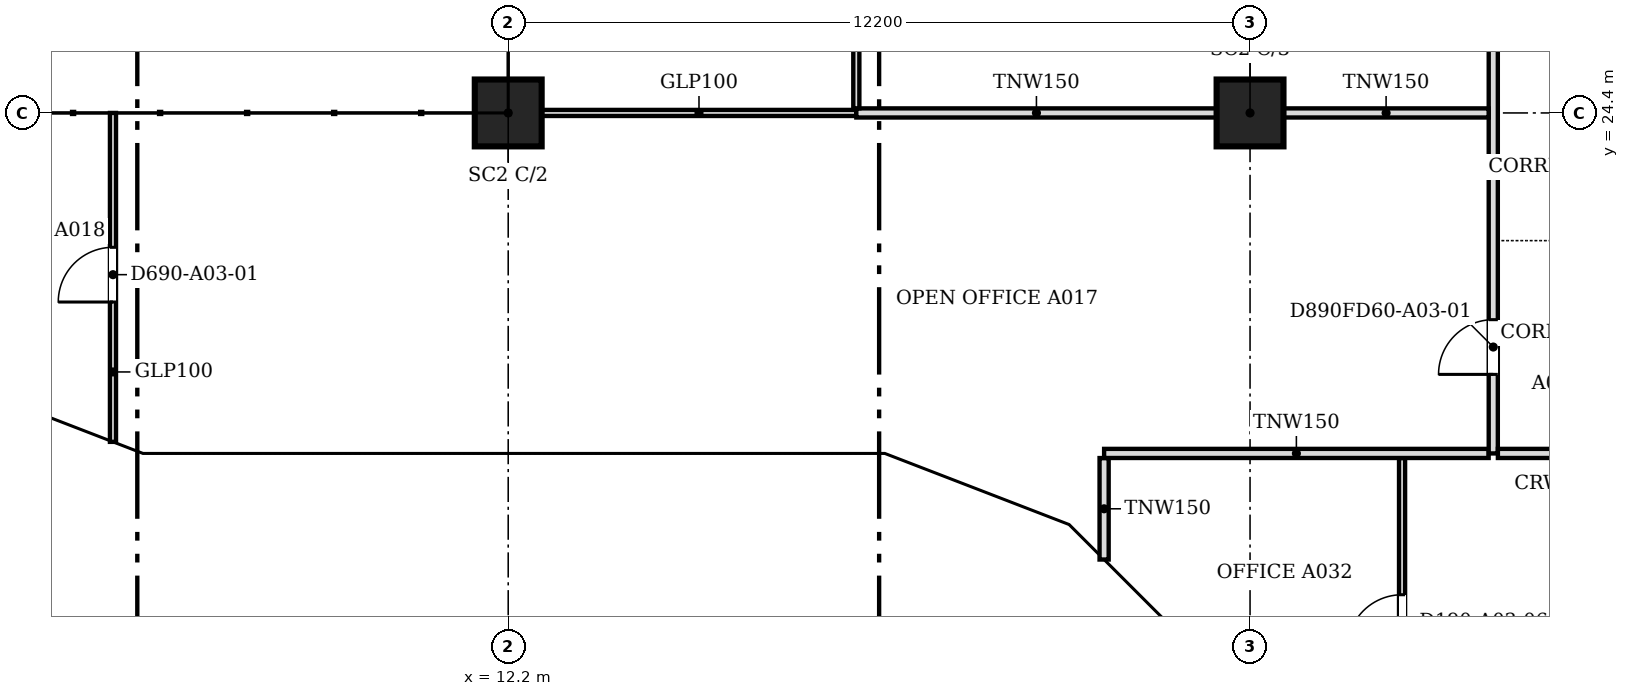
"""IFC4 building model, lengths in metres.
Left out: names, types, materials, properties, quantities, classifications, styles, units other than length and angle.
Written with IfcOpenShell. Run it as: python <this file> out.ifc"""

import sys

from ifc_helpers import new_model, si_unit, direction, frame, frame_2d, origin, origin_2d, place, context, subcontext, project, spatial, polyline, rectangle, outline, extrude, faceted_brep, source, transform, mapped, element, fill, save


model = new_model("IFC4")
c1 = context("Model", 3, precision=1e-05, world=origin(), true_north=direction((0.0, 1.0)))
c2 = subcontext(c1, "Body", "Model", "MODEL_VIEW")
j1 = project(units=[si_unit("LENGTHUNIT", "METRE"), si_unit("PLANEANGLEUNIT", "RADIAN")], contexts=[c1])
p1 = place(None, origin())
s1 = spatial("IfcSite", under=j1, at=p1, CompositionType="ELEMENT")
p2 = place(p1, origin())
s2 = spatial("IfcBuilding", under=s1, at=p2, CompositionType="ELEMENT")
p3 = place(p2, frame((0.0, 0.0, 37.2)))
s3 = spatial("IfcBuildingStorey", under=s2, at=p3, CompositionType="ELEMENT", Elevation=37.2)
for number, where, z_axis, x_axis in (
    (1, (12.2, 24.4, 0.0), (0.0, 0.0, 1.0), (1.0, 0.0, 0.0)),
    (2, (24.4, 24.4, 0.0), (0.0, 0.0, 1.0), (1.0, 0.0, 0.0)),
):
    element("IfcColumn", number, at=place(p3, frame(where, z_axis=z_axis, x_axis=x_axis)), inside=s3, PredefinedType="COLUMN", context=c2, shape_type="SweptSolid", body=[
        extrude(rectangle(XDim=1.1, YDim=1.1, at=origin_2d()), origin(), (0.0, 0.0, 1.0), 3.6),
    ])
m1 = source(origin(), c2, "Body", "Brep", [
    faceted_brep([(0.053, -0.25, 0.0), (3.003, -0.25, 3.8), (0.053, -0.25, 7.6), (0.0, -0.25, 7.532), (0.0, -0.25, 0.068), (0.106, 0.25, 7.532), (2.957, 0.25, 3.86), (2.957, 0.25, 3.74), (0.106, 0.25, 0.068), (3.003, 0.0, 3.8), (0.053, 0.0, 0.0), (0.053, 0.0, 7.6)], [[[0, 1, 2, 3, 4]], [[5, 6, 7, 8]], [[8, 7, 9, 1, 0, 10]], [[6, 5, 11, 2, 1, 9]], [[3, 2, 11]], [[10, 0, 4]], [[8, 10, 4, 3, 11, 5]], [[9, 7, 6]]]),
])
p4 = place(p3, frame((3.344, 19.631, -3.8), z_axis=(0.0, 0.0, 1.0), x_axis=(0.933007896601, -0.359855894603, 0.0)))
e3 = element("IfcWall", 3, at=p4, inside=s3, PredefinedType="SOLIDWALL", context=c2, shape_type="MappedRepresentation", body=[
    mapped(m1, transform((0.0, 0.0, 0.0), scale=1.0)),
])
m2 = source(origin(), c2, "Body", "SweptSolid", [
    extrude(outline(polyline([(0.253, 0.665), (2.687, 3.8), (0.253, 6.935), (0.253, 0.665)])), frame((0.0, 0.26, 0.0), z_axis=(0.0, -1.0, 0.0), x_axis=(1.0, 0.0, 0.0)), (0.0, 0.0, 1.0), 0.52),
])
p5 = place(p4, origin())
e4 = element("IfcOpeningElement", 4, at=p5, cuts=e3, PredefinedType="OPENING", context=c2, shape_type="MappedRepresentation", body=[
    mapped(m2, transform((0.0, 0.0, 0.0), scale=1.0)),
])
m3 = source(origin(), c2, "Body", "Brep", [
    faceted_brep([(3.003, -0.25, 0.0), (6.053, -0.25, 3.8), (3.003, -0.25, 7.6), (0.0, -0.25, 3.8), (0.047, 0.25, 3.859), (3.003, 0.25, 7.6), (6.053, 0.25, 3.8), (3.003, 0.25, 0.0), (0.047, 0.25, 3.741), (0.0, 0.0, 3.8)], [[[0, 1, 2, 3]], [[4, 5, 6, 7, 8]], [[7, 6, 1, 0]], [[6, 5, 2, 1]], [[5, 4, 9, 3, 2]], [[8, 7, 0, 3, 9]], [[8, 9, 4]]]),
])
p6 = place(p3, frame((6.146, 18.55, -3.8), z_axis=(0.0, 0.0, 1.0), x_axis=(1.0, 0.0, 0.0)))
e5 = element("IfcWall", 5, at=p6, inside=s3, PredefinedType="SOLIDWALL", context=c2, shape_type="MappedRepresentation", body=[
    mapped(m3, transform((0.0, 0.0, 0.0), scale=1.0)),
])
m4 = source(origin(), c2, "Body", "SweptSolid", [
    extrude(outline(polyline([(3.005, 0.401), (5.733, 3.8), (3.005, 7.199), (0.319, 3.8), (3.005, 0.401)])), frame((0.0, 0.26, 0.0), z_axis=(0.0, -1.0, 0.0), x_axis=(1.0, 0.0, 0.0)), (0.0, 0.0, 1.0), 0.52),
])
p7 = place(p6, origin())
e6 = element("IfcOpeningElement", 6, at=p7, cuts=e5, PredefinedType="OPENING", context=c2, shape_type="MappedRepresentation", body=[
    mapped(m4, transform((0.0, 0.0, 0.0), scale=1.0)),
])
m5 = source(origin(), c2, "Body", "Brep", [
    faceted_brep([(3.05, -0.25, 0.0), (6.1, -0.25, 3.743), (6.1, -0.25, 3.857), (3.05, -0.25, 7.6), (0.0, -0.25, 3.8), (0.0, 0.25, 3.8), (3.05, 0.25, 7.6), (6.146, 0.25, 3.8), (3.05, 0.25, 0.0), (6.146, -0.0, 3.8)], [[[0, 1, 2, 3, 4]], [[5, 6, 7, 8]], [[8, 7, 9, 1, 0]], [[7, 6, 3, 2, 9]], [[6, 5, 4, 3]], [[5, 8, 0, 4]], [[1, 9, 2]]]),
])
p8 = place(p3, frame((12.2, 18.55, -3.8), z_axis=(0.0, 0.0, 1.0), x_axis=(1.0, 0.0, 0.0)))
e7 = element("IfcWall", 7, at=p8, inside=s3, PredefinedType="SOLIDWALL", context=c2, shape_type="MappedRepresentation", body=[
    mapped(m5, transform((0.0, 0.0, 0.0), scale=1.0)),
])
m6 = source(origin(), c2, "Body", "SweptSolid", [
    extrude(outline(polyline([(3.052, 0.398), (5.824, 3.8), (3.052, 7.203), (0.321, 3.8), (3.052, 0.398)])), frame((0.0, 0.26, 0.0), z_axis=(0.0, -1.0, 0.0), x_axis=(1.0, 0.0, 0.0)), (0.0, 0.0, 1.0), 0.52),
])
p9 = place(p8, origin())
e8 = element("IfcOpeningElement", 8, at=p9, cuts=e7, PredefinedType="OPENING", context=c2, shape_type="MappedRepresentation", body=[
    mapped(m6, transform((0.0, 0.0, 0.0), scale=1.0)),
])
m7 = source(origin(), c2, "Body", "Brep", [
    faceted_brep([(3.096, -0.25, 7.536), (0.047, -0.25, 3.856), (0.047, -0.25, 3.744), (3.096, -0.25, 0.064), (0.0, 0.25, 3.8), (3.149, 0.25, 7.6), (3.202, 0.25, 7.536), (3.202, 0.25, 0.064), (3.149, 0.25, 0.0), (3.149, -0.0, 0.0), (3.149, -0.0, 7.6), (0.0, 0.0, 3.8)], [[[0, 1, 2, 3]], [[4, 5, 6, 7, 8]], [[8, 7, 9]], [[6, 5, 10]], [[5, 4, 11, 1, 0, 10]], [[4, 8, 9, 3, 2, 11]], [[11, 2, 1]], [[3, 9, 7, 6, 10, 0]]]),
])
p10 = place(p3, frame((18.346, 18.55, -3.8), z_axis=(0.0, 0.0, 1.0), x_axis=(0.932985567668, -0.359913782069, 0.0)))
e9 = element("IfcWall", 9, at=p10, inside=s3, PredefinedType="SOLIDWALL", context=c2, shape_type="MappedRepresentation", body=[
    mapped(m7, transform((0.0, 0.0, 0.0), scale=1.0)),
])
m8 = source(origin(), c2, "Body", "SweptSolid", [
    extrude(outline(polyline([(2.949, 6.967), (0.325, 3.8), (2.949, 0.633), (2.949, 6.967)])), frame((0.0, 0.26, 0.0), z_axis=(0.0, -1.0, 0.0), x_axis=(1.0, 0.0, 0.0)), (0.0, 0.0, 1.0), 0.52),
])
p11 = place(p10, origin())
e10 = element("IfcOpeningElement", 10, at=p11, cuts=e9, PredefinedType="OPENING", context=c2, shape_type="MappedRepresentation", body=[
    mapped(m8, transform((0.0, 0.0, 0.0), scale=1.0)),
])
m9 = source(origin(), c2, "Body", "Brep", [
    faceted_brep([(0.106, -0.25, 0.064), (3.156, -0.25, 3.736), (3.156, -0.25, 3.864), (0.106, -0.25, 7.536), (0.0, 0.25, 7.536), (0.053, 0.25, 7.6), (3.209, 0.25, 3.8), (0.053, 0.25, 0.0), (0.0, 0.25, 0.064), (3.209, -0.0, 3.8), (0.053, 0.0, 0.0), (0.053, 0.0, 7.6)], [[[0, 1, 2, 3]], [[4, 5, 6, 7, 8]], [[7, 6, 9, 1, 0, 10]], [[6, 5, 11, 3, 2, 9]], [[5, 4, 11]], [[8, 7, 10]], [[8, 10, 0, 3, 11, 4]], [[1, 9, 2]]]),
])
p12 = place(p3, frame((21.248, 17.454, -3.8), z_axis=(0.0, 0.0, 1.0), x_axis=(0.707106781187, -0.707106781187, 0.0)))
e11 = element("IfcWall", 11, at=p12, inside=s3, PredefinedType="SOLIDWALL", context=c2, shape_type="MappedRepresentation", body=[
    mapped(m9, transform((0.0, 0.0, 0.0), scale=1.0)),
])
m10 = source(origin(), c2, "Body", "SweptSolid", [
    extrude(outline(polyline([(0.253, 0.632), (2.884, 3.8), (0.253, 6.968), (0.253, 0.632)])), frame((0.0, 0.26, 0.0), z_axis=(0.0, -1.0, 0.0), x_axis=(1.0, 0.0, 0.0)), (0.0, 0.0, 1.0), 0.52),
])
p13 = place(p12, origin())
e12 = element("IfcOpeningElement", 12, at=p13, cuts=e11, PredefinedType="OPENING", context=c2, shape_type="MappedRepresentation", body=[
    mapped(m10, transform((0.0, 0.0, 0.0), scale=1.0)),
])
p14 = place(p2, frame((0.0, 0.0, 41.0)))
s4 = spatial("IfcBuildingStorey", under=s2, at=p14, CompositionType="ELEMENT", Elevation=41.0)
m11 = source(origin(), c2, "Body", "Brep", [
    faceted_brep([(2.95, -0.25, 0.0), (2.997, -0.25, 0.059), (2.997, -0.25, 7.541), (2.95, -0.25, 7.6), (0.0, -0.25, 3.8), (0.053, 0.25, 3.868), (2.904, 0.25, 7.54), (2.904, 0.25, 0.06), (0.053, 0.25, 3.732), (2.95, 0.0, 0.0), (2.95, 0.0, 7.6), (0.0, 0.0, 3.8)], [[[0, 1, 2, 3, 4]], [[5, 6, 7, 8]], [[1, 0, 9]], [[10, 3, 2]], [[6, 5, 11, 4, 3, 10]], [[8, 7, 9, 0, 4, 11]], [[8, 11, 5]], [[1, 9, 7, 6, 10, 2]]]),
])
p15 = place(p14, frame((3.394, 19.612, -3.8), z_axis=(0.0, 0.0, 1.0), x_axis=(0.932990326376, -0.359901446078, 0.0)))
e13 = element("IfcWall", 13, at=p15, inside=s4, PredefinedType="SOLIDWALL", context=c2, shape_type="MappedRepresentation", body=[
    mapped(m11, transform((0.0, 0.0, 0.0), scale=1.0)),
])
m12 = source(origin(), c2, "Body", "SweptSolid", [
    extrude(outline(polyline([(2.75, 6.935), (0.316, 3.8), (2.75, 0.665), (2.75, 6.935)])), frame((0.0, 0.26, 0.0), z_axis=(0.0, -1.0, 0.0), x_axis=(1.0, 0.0, 0.0)), (0.0, 0.0, 1.0), 0.52),
])
p16 = place(p15, origin())
e14 = element("IfcOpeningElement", 14, at=p16, cuts=e13, PredefinedType="OPENING", context=c2, shape_type="MappedRepresentation", body=[
    mapped(m12, transform((0.0, 0.0, 0.0), scale=1.0)),
])
m13 = source(origin(), c2, "Body", "Brep", [
    faceted_brep([(0.047, -0.25, 0.0), (3.05, -0.25, 3.8), (0.047, -0.25, 7.6), (0.0, -0.25, 7.54), (0.0, -0.25, 0.06), (0.093, 0.25, 7.541), (3.05, 0.25, 3.8), (0.093, 0.25, 0.059), (0.047, 0.0, 0.0), (0.047, 0.0, 7.6)], [[[0, 1, 2, 3, 4]], [[5, 6, 7]], [[7, 6, 1, 0, 8]], [[6, 5, 9, 2, 1]], [[3, 2, 9]], [[8, 0, 4]], [[7, 8, 4, 3, 9, 5]]]),
])
p17 = place(p14, frame((6.1, 18.55, -3.8), z_axis=(0.0, 0.0, 1.0), x_axis=(1.0, 0.0, 0.0)))
e15 = element("IfcWall", 15, at=p17, inside=s4, PredefinedType="SOLIDWALL", context=c2, shape_type="MappedRepresentation", body=[
    mapped(m13, transform((0.0, 0.0, 0.0), scale=1.0)),
])
m14 = source(origin(), c2, "Body", "SweptSolid", [
    extrude(outline(polyline([(0.247, 0.656), (2.731, 3.8), (0.247, 6.944), (0.247, 0.656)])), frame((0.0, 0.26, 0.0), z_axis=(0.0, -1.0, 0.0), x_axis=(1.0, 0.0, 0.0)), (0.0, 0.0, 1.0), 0.52),
])
p18 = place(p17, origin())
e16 = element("IfcOpeningElement", 16, at=p18, cuts=e15, PredefinedType="OPENING", context=c2, shape_type="MappedRepresentation", body=[
    mapped(m14, transform((0.0, 0.0, 0.0), scale=1.0)),
])
m15 = source(origin(), c2, "Body", "SweptSolid", [
    extrude(outline(polyline([(3.05, 0.0), (6.1, 3.8), (3.05, 7.6), (0.0, 3.8), (3.05, 0.0)])), frame((0.0, 0.25, 0.0), z_axis=(0.0, -1.0, 0.0), x_axis=(1.0, 0.0, 0.0)), (0.0, 0.0, 1.0), 0.5),
])
p19 = place(p14, frame((9.15, 18.55, -3.8), z_axis=(0.0, 0.0, 1.0), x_axis=(1.0, 0.0, 0.0)))
e17 = element("IfcWall", 17, at=p19, inside=s4, PredefinedType="SOLIDWALL", context=c2, shape_type="MappedRepresentation", body=[
    mapped(m15, transform((0.0, 0.0, 0.0), scale=1.0)),
])
m16 = source(origin(), c2, "Body", "SweptSolid", [
    extrude(outline(polyline([(3.05, 0.399), (5.78, 3.8), (3.05, 7.201), (0.321, 3.8), (3.05, 0.399)])), frame((0.0, 0.26, 0.0), z_axis=(0.0, -1.0, 0.0), x_axis=(1.0, 0.0, 0.0)), (0.0, 0.0, 1.0), 0.52),
])
p20 = place(p19, origin())
e18 = element("IfcOpeningElement", 18, at=p20, cuts=e17, PredefinedType="OPENING", context=c2, shape_type="MappedRepresentation", body=[
    mapped(m16, transform((0.0, 0.0, 0.0), scale=1.0)),
])
m17 = source(origin(), c2, "Body", "Brep", [
    faceted_brep([(3.05, -0.25, 7.543), (0.0, -0.25, 3.8), (3.05, -0.25, 0.057), (0.0, 0.25, 3.8), (3.096, 0.25, 7.6), (3.143, 0.25, 7.544), (3.143, 0.25, 0.056), (3.096, 0.25, 0.0), (3.096, -0.0, 0.0), (3.096, -0.0, 7.6)], [[[0, 1, 2]], [[3, 4, 5, 6, 7]], [[7, 6, 8]], [[5, 4, 9]], [[4, 3, 1, 0, 9]], [[3, 7, 8, 2, 1]], [[2, 8, 6, 5, 9, 0]]]),
])
p21 = place(p14, frame((15.25, 18.55, -3.8), z_axis=(0.0, 0.0, 1.0), x_axis=(1.0, 0.0, 0.0)))
e19 = element("IfcWall", 19, at=p21, inside=s4, PredefinedType="SOLIDWALL", context=c2, shape_type="MappedRepresentation", body=[
    mapped(m17, transform((0.0, 0.0, 0.0), scale=1.0)),
])
m18 = source(origin(), c2, "Body", "SweptSolid", [
    extrude(outline(polyline([(2.896, 6.959), (0.323, 3.8), (2.896, 0.641), (2.896, 6.959)])), frame((0.0, 0.26, 0.0), z_axis=(0.0, -1.0, 0.0), x_axis=(1.0, 0.0, 0.0)), (0.0, 0.0, 1.0), 0.52),
])
p22 = place(p21, origin())
e20 = element("IfcOpeningElement", 20, at=p22, cuts=e19, PredefinedType="OPENING", context=c2, shape_type="MappedRepresentation", body=[
    mapped(m18, transform((0.0, 0.0, 0.0), scale=1.0)),
])
m19 = source(origin(), c2, "Body", "Brep", [
    faceted_brep([(0.093, -0.25, 0.056), (3.143, -0.25, 3.736), (3.143, -0.25, 3.864), (0.093, -0.25, 7.544), (0.0, 0.25, 7.543), (0.047, 0.25, 7.6), (3.196, 0.25, 3.8), (0.047, 0.25, 0.0), (0.0, 0.25, 0.057), (3.196, -0.0, 3.8), (0.047, 0.0, 0.0), (0.047, 0.0, 7.6)], [[[0, 1, 2, 3]], [[4, 5, 6, 7, 8]], [[7, 6, 9, 1, 0, 10]], [[6, 5, 11, 3, 2, 9]], [[5, 4, 11]], [[8, 7, 10]], [[8, 10, 0, 3, 11, 4]], [[1, 9, 2]]]),
])
p23 = place(p14, frame((18.303, 18.567, -3.8), z_axis=(0.0, 0.0, 1.0), x_axis=(0.932978940178, -0.359930961693, 0.0)))
e21 = element("IfcWall", 21, at=p23, inside=s4, PredefinedType="SOLIDWALL", context=c2, shape_type="MappedRepresentation", body=[
    mapped(m19, transform((0.0, 0.0, 0.0), scale=1.0)),
])
m20 = source(origin(), c2, "Body", "SweptSolid", [
    extrude(outline(polyline([(0.247, 0.633), (2.871, 3.8), (0.247, 6.967), (0.247, 0.633)])), frame((0.0, 0.26, 0.0), z_axis=(0.0, -1.0, 0.0), x_axis=(1.0, 0.0, 0.0)), (0.0, 0.0, 1.0), 0.52),
])
p24 = place(p23, origin())
e22 = element("IfcOpeningElement", 22, at=p24, cuts=e21, PredefinedType="OPENING", context=c2, shape_type="MappedRepresentation", body=[
    mapped(m20, transform((0.0, 0.0, 0.0), scale=1.0)),
])
m21 = source(origin(), c2, "Body", "Brep", [
    faceted_brep([(3.103, -0.25, 7.536), (0.053, -0.25, 3.864), (0.053, -0.25, 3.736), (3.103, -0.25, 0.064), (0.0, 0.25, 3.8), (3.156, 0.25, 7.6), (3.209, 0.25, 7.536), (3.209, 0.25, 0.064), (3.156, 0.25, 0.0), (3.156, -0.0, 0.0), (3.156, -0.0, 7.6), (0.0, 0.0, 3.8)], [[[0, 1, 2, 3]], [[4, 5, 6, 7, 8]], [[8, 7, 9]], [[6, 5, 10]], [[5, 4, 11, 1, 0, 10]], [[4, 8, 9, 3, 2, 11]], [[11, 2, 1]], [[3, 9, 7, 6, 10, 0]]]),
])
p25 = place(p14, frame((21.285, 17.417, -3.8), z_axis=(0.0, 0.0, 1.0), x_axis=(0.707106781187, -0.707106781187, 0.0)))
e23 = element("IfcWall", 23, at=p25, inside=s4, PredefinedType="SOLIDWALL", context=c2, shape_type="MappedRepresentation", body=[
    mapped(m21, transform((0.0, 0.0, 0.0), scale=1.0)),
])
m22 = source(origin(), c2, "Body", "SweptSolid", [
    extrude(outline(polyline([(2.956, 6.968), (0.325, 3.8), (2.956, 0.632), (2.956, 6.968)])), frame((0.0, 0.26, 0.0), z_axis=(0.0, -1.0, 0.0), x_axis=(1.0, 0.0, 0.0)), (0.0, 0.0, 1.0), 0.52),
])
p26 = place(p25, origin())
e24 = element("IfcOpeningElement", 24, at=p26, cuts=e23, PredefinedType="OPENING", context=c2, shape_type="MappedRepresentation", body=[
    mapped(m22, transform((0.0, 0.0, 0.0), scale=1.0)),
])
p27 = place(p3, frame((26.9, 13.276, 0.0), z_axis=(0.0, 0.0, 1.0), x_axis=(0.0, 1.0, 0.0)))
e25 = element("IfcWall", 25, at=p27, inside=s3, PredefinedType="PARTITIONING", context=c2, shape_type="SweptSolid", body=[
    extrude(rectangle(XDim=5.448, YDim=0.1, at=frame_2d((2.724, 0.0))), origin(), (0.0, 0.0, 1.0), 3.067),
])
m23 = source(origin(), c2, "Body", "SweptSolid", [
    extrude(rectangle(XDim=0.9, YDim=2.1, at=frame_2d((0.45, 1.05))), frame((0.0, 0.06, 0.0), z_axis=(0.0, -1.0, 0.0), x_axis=(1.0, 0.0, 0.0)), (0.0, 0.0, 1.0), 0.12),
])
p28 = place(p27, frame((2.3, 0.0, 0.0)))
e26 = element("IfcOpeningElement", 26, at=p28, cuts=e25, PredefinedType="OPENING", context=c2, shape_type="MappedRepresentation", body=[
    mapped(m23, transform((0.0, 0.0, 0.0), scale=1.0)),
])
p29 = place(p3, frame((22.0, 17.055, 0.0), z_axis=(0.0, 0.0, 1.0), x_axis=(0.0, 1.0, 0.0)))
e27 = element("IfcWall", 27, at=p29, inside=s3, PredefinedType="PARTITIONING", context=c2, shape_type="SweptSolid", body=[
    extrude(rectangle(XDim=1.669, YDim=0.15, at=frame_2d((0.834, 0.0))), origin(), (0.0, 0.0, 1.0), 3.067),
])
p30 = place(p3, frame((22.0, 18.8, 0.0), z_axis=(0.0, 0.0, 1.0), x_axis=(1.0, 0.0, 0.0)))
e28 = element("IfcWall", 28, at=p30, inside=s3, PredefinedType="PARTITIONING", context=c2, shape_type="SweptSolid", body=[
    extrude(rectangle(XDim=6.324, YDim=0.15, at=frame_2d((3.162, 0.0))), origin(), (0.0, 0.0, 1.0), 3.067),
])
p31 = place(p3, frame((28.4, 18.8, 0.0), z_axis=(0.0, 0.0, 1.0), x_axis=(0.0, 1.0, 0.0)))
e29 = element("IfcWall", 29, at=p31, inside=s3, PredefinedType="PARTITIONING", context=c2, shape_type="SweptSolid", body=[
    extrude(rectangle(XDim=26.824, YDim=0.15, at=frame_2d((13.412, 0.0))), origin(), (0.0, 0.0, 1.0), 3.067),
])
m24 = source(origin(), c2, "Body", "SweptSolid", [
    extrude(rectangle(XDim=0.9, YDim=2.1, at=frame_2d((0.45, 1.05))), frame((0.0, 0.085, 0.0), z_axis=(0.0, -1.0, 0.0), x_axis=(1.0, 0.0, 0.0)), (0.0, 0.0, 1.0), 0.17),
])
p32 = place(p31, frame((1.3, 0.0, 0.0)))
e30 = element("IfcOpeningElement", 30, at=p32, cuts=e29, PredefinedType="OPENING", context=c2, shape_type="MappedRepresentation", body=[
    mapped(m24, transform((0.0, 0.0, 0.0), scale=1.0)),
])
p33 = place(p31, frame((14.301, 0.0, 0.0)))
e31 = element("IfcOpeningElement", 31, at=p33, cuts=e29, PredefinedType="OPENING", context=c2, shape_type="MappedRepresentation", body=[
    mapped(m24, transform((0.0, 0.0, 0.0), scale=1.0)),
])
p34 = place(p31, frame((8.2, 0.0, 0.0)))
e32 = element("IfcOpeningElement", 32, at=p34, cuts=e29, PredefinedType="OPENING", context=c2, shape_type="MappedRepresentation", body=[
    mapped(m24, transform((0.0, 0.0, 0.0), scale=1.0)),
])
p35 = place(p31, frame((21.9, 0.0, 0.0)))
e33 = element("IfcOpeningElement", 33, at=p35, cuts=e29, PredefinedType="OPENING", context=c2, shape_type="MappedRepresentation", body=[
    mapped(m24, transform((0.0, 0.0, 0.0), scale=1.0)),
])
p36 = place(p3, frame((28.476, 18.8, 0.0), z_axis=(0.0, 0.0, 1.0), x_axis=(1.0, 0.0, 0.0)))
e34 = element("IfcWall", 34, at=p36, inside=s3, PredefinedType="PARTITIONING", context=c2, shape_type="SweptSolid", body=[
    extrude(rectangle(XDim=1.948, YDim=0.15, at=frame_2d((0.974, 0.0))), origin(), (0.0, 0.0, 1.0), 3.067),
])
p37 = place(p3, frame((5.7, 18.99, 0.0), z_axis=(0.0, 0.0, 1.0), x_axis=(0.0, 1.0, 0.0)))
e35 = element("IfcWall", 35, at=p37, inside=s3, PredefinedType="PARTITIONING", context=c2, shape_type="SweptSolid", body=[
    extrude(rectangle(XDim=5.41, YDim=0.1, at=frame_2d((2.705, 0.0))), origin(), (0.0, 0.0, 1.0), 3.067),
])
p38 = place(p37, frame((2.3, 0.0, 0.0)))
e36 = element("IfcOpeningElement", 36, at=p38, cuts=e35, PredefinedType="OPENING", context=c2, shape_type="MappedRepresentation", body=[
    mapped(m23, transform((0.0, 0.0, 0.0), scale=1.0)),
])
p39 = place(p3, frame((12.751, 24.4, 0.0), z_axis=(0.0, 0.0, 1.0), x_axis=(1.0, 0.0, 0.0)))
e37 = element("IfcWall", 37, at=p39, inside=s3, PredefinedType="PARTITIONING", context=c2, shape_type="SweptSolid", body=[
    extrude(rectangle(XDim=5.173, YDim=0.1, at=frame_2d((2.586, 0.0))), origin(), (0.0, 0.0, 1.0), 3.067),
])
p40 = place(p3, frame((17.925, 24.4, 0.0), z_axis=(0.0, 0.0, 1.0), x_axis=(1.0, 0.0, 0.0)))
e38 = element("IfcWall", 38, at=p40, inside=s3, PredefinedType="PARTITIONING", context=c2, shape_type="SweptSolid", body=[
    extrude(rectangle(XDim=5.924, YDim=0.15, at=frame_2d((2.962, 0.0))), origin(), (0.0, 0.0, 1.0), 3.067),
])
p41 = place(p3, frame((24.951, 24.4, 0.0), z_axis=(0.0, 0.0, 1.0), x_axis=(1.0, 0.0, 0.0)))
e39 = element("IfcWall", 39, at=p41, inside=s3, PredefinedType="PARTITIONING", context=c2, shape_type="SweptSolid", body=[
    extrude(rectangle(XDim=3.373, YDim=0.15, at=frame_2d((1.687, 0.0))), origin(), (0.0, 0.0, 1.0), 3.067),
])
p42 = place(p3, frame((17.925, 24.476, 0.0), z_axis=(0.0, 0.0, 1.0), x_axis=(0.0, 1.0, 0.0)))
e40 = element("IfcWall", 40, at=p42, inside=s3, PredefinedType="PARTITIONING", context=c2, shape_type="SweptSolid", body=[
    extrude(rectangle(XDim=5.948, YDim=0.1, at=frame_2d((2.974, 0.0))), origin(), (0.0, 0.0, 1.0), 3.067),
])
p43 = place(p42, frame((2.5, 0.0, 0.0)))
e41 = element("IfcOpeningElement", 41, at=p43, cuts=e40, PredefinedType="OPENING", context=c2, shape_type="MappedRepresentation", body=[
    mapped(m23, transform((0.0, 0.0, 0.0), scale=1.0)),
])
m25 = source(origin(), c2, "Body", "SweptSolid", [
    extrude(rectangle(XDim=0.9, YDim=2.1, at=frame_2d((0.45, 1.05))), frame((0.0, 0.025, 0.0), z_axis=(0.0, -1.0, 0.0), x_axis=(1.0, 0.0, 0.0)), (0.0, 0.0, 1.0), 0.05),
])
p44 = place(p32, origin())
e42 = element("IfcDoor", 42, at=p44, inside=s3, OperationType="SINGLE_SWING_LEFT", PredefinedType="DOOR", context=c2, shape_type="MappedRepresentation", body=[
    mapped(m25, transform((0.0, 0.0, 0.0), scale=1.0)),
])
fill(e30, e42)
p45 = place(p38, origin())
e43 = element("IfcDoor", 43, at=p45, inside=s3, OperationType="SINGLE_SWING_LEFT", PredefinedType="DOOR", context=c2, shape_type="MappedRepresentation", body=[
    mapped(m25, transform((0.0, 0.0, 0.0), scale=1.0)),
])
fill(e36, e43)
p46 = place(p28, origin())
e44 = element("IfcDoor", 44, at=p46, inside=s3, OperationType="SINGLE_SWING_LEFT", PredefinedType="DOOR", context=c2, shape_type="MappedRepresentation", body=[
    mapped(m25, transform((0.0, 0.0, 0.0), scale=1.0)),
])
fill(e26, e44)
save(model, sys.argv[1])
